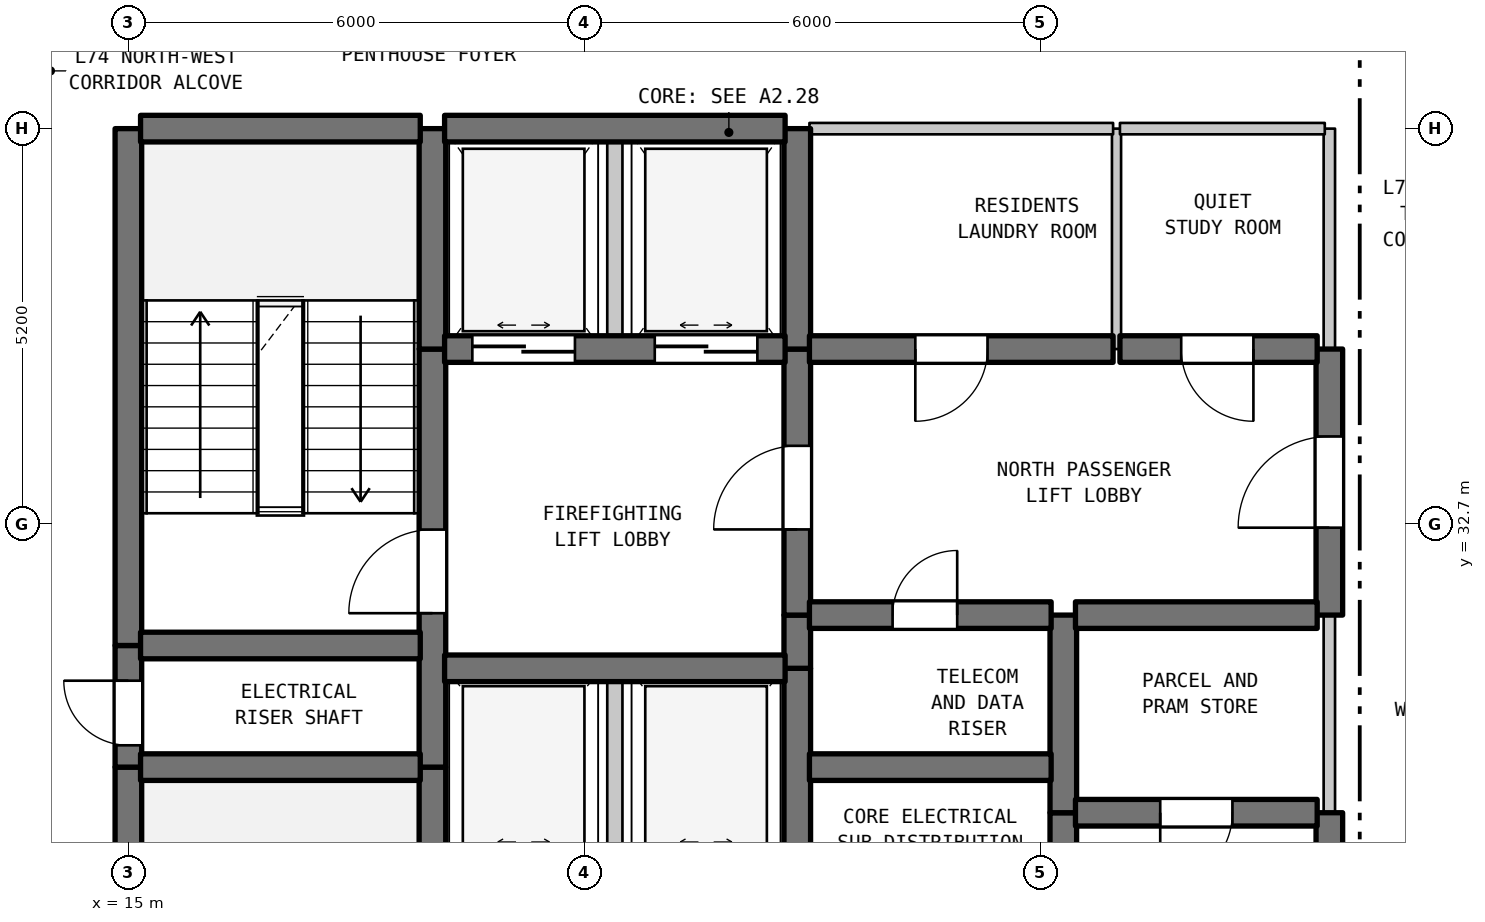
"""IFC4 building model, lengths in metres.
Left out: names, types, materials, properties, quantities, classifications, styles, units other than length and angle.
Written with IfcOpenShell. Run it as: python <this file> out.ifc"""

import sys

from ifc_helpers import new_model, si_unit, direction, frame, frame_2d, origin, place, context, subcontext, project, spatial, rectangle, extrude, element, fill, save


model = new_model("IFC4")
c1 = context("Model", 3, precision=1e-05, world=origin(), true_north=direction((0.0, 1.0)))
c2 = subcontext(c1, "Body", "Model", "MODEL_VIEW")
j1 = project(units=[si_unit("LENGTHUNIT", "METRE"), si_unit("PLANEANGLEUNIT", "RADIAN")], contexts=[c1])
p1 = place(None, origin())
s1 = spatial("IfcSite", under=j1, at=p1, CompositionType="ELEMENT")
p2 = place(p1, origin())
s2 = spatial("IfcBuilding", under=s1, at=p2, CompositionType="ELEMENT")
p3 = place(p2, frame((0.0, 0.0, 295.4)))
s3 = spatial("IfcBuildingStorey", under=s2, at=p3, CompositionType="ELEMENT", Elevation=295.4)
p4 = place(p3, frame((15.0, 22.7, 0.0), z_axis=(0.0, 0.0, 1.0), x_axis=(0.0, 1.0, 0.0)))
e1 = element("IfcWall", 1, at=p4, inside=s3, PredefinedType="SHEAR", context=c2, shape_type="SweptSolid", body=[
    extrude(rectangle(XDim=6.8, YDim=0.35, at=frame_2d((3.4, 0.0))), origin(), (0.0, 0.0, 1.0), 3.38),
])
p5 = place(p3, frame((15.0, 29.5, 0.0), z_axis=(0.0, 0.0, 1.0), x_axis=(0.0, 1.0, 0.0)))
e2 = element("IfcWall", 2, at=p5, inside=s3, PredefinedType="SHEAR", context=c2, shape_type="SweptSolid", body=[
    extrude(rectangle(XDim=1.6, YDim=0.35, at=frame_2d((0.8, 0.0))), origin(), (0.0, 0.0, 1.0), 3.38),
])
p6 = place(p5, frame((0.287, 0.0, 0.0)))
e3 = element("IfcOpeningElement", 3, at=p6, cuts=e2, PredefinedType="OPENING", context=c2, shape_type="SweptSolid", body=[
    extrude(rectangle(XDim=0.85, YDim=2.1, at=frame_2d((0.425, 1.05))), frame((0.0, 0.185, 0.0), z_axis=(0.0, -1.0, 0.0), x_axis=(1.0, 0.0, 0.0)), (0.0, 0.0, 1.0), 0.37),
])
p7 = place(p3, frame((15.0, 31.1, 0.0), z_axis=(0.0, 0.0, 1.0), x_axis=(0.0, 1.0, 0.0)))
e4 = element("IfcWall", 4, at=p7, inside=s3, PredefinedType="SHEAR", context=c2, shape_type="SweptSolid", body=[
    extrude(rectangle(XDim=6.8, YDim=0.35, at=frame_2d((3.4, 0.0))), origin(), (0.0, 0.0, 1.0), 3.38),
])
p8 = place(p3, frame((19.0, 28.2, 0.0), z_axis=(0.0, 0.0, 1.0), x_axis=(0.0, 1.0, 0.0)))
e5 = element("IfcWall", 5, at=p8, inside=s3, PredefinedType="SHEAR", context=c2, shape_type="SweptSolid", body=[
    extrude(rectangle(XDim=1.3, YDim=0.35, at=frame_2d((0.65, 0.0))), origin(), (0.0, 0.0, 1.0), 3.38),
])
p9 = place(p3, frame((19.0, 29.5, 0.0), z_axis=(0.0, 0.0, 1.0), x_axis=(0.0, 1.0, 0.0)))
e6 = element("IfcWall", 6, at=p9, inside=s3, PredefinedType="SHEAR", context=c2, shape_type="SweptSolid", body=[
    extrude(rectangle(XDim=5.5, YDim=0.35, at=frame_2d((2.75, 0.0))), origin(), (0.0, 0.0, 1.0), 3.38),
])
p10 = place(p9, frame((2.025, 0.0, 0.0)))
e7 = element("IfcOpeningElement", 7, at=p10, cuts=e6, PredefinedType="OPENING", context=c2, shape_type="SweptSolid", body=[
    extrude(rectangle(XDim=1.1, YDim=2.15, at=frame_2d((0.55, 1.075))), frame((0.0, 0.185, 0.0), z_axis=(0.0, -1.0, 0.0), x_axis=(1.0, 0.0, 0.0)), (0.0, 0.0, 1.0), 0.37),
])
p11 = place(p3, frame((19.0, 35.0, 0.0), z_axis=(0.0, 0.0, 1.0), x_axis=(0.0, 1.0, 0.0)))
e8 = element("IfcWall", 8, at=p11, inside=s3, PredefinedType="SHEAR", context=c2, shape_type="SweptSolid", body=[
    extrude(rectangle(XDim=2.9, YDim=0.35, at=frame_2d((1.45, 0.0))), origin(), (0.0, 0.0, 1.0), 3.38),
])
p12 = place(p3, frame((21.4, 28.2, 0.0), z_axis=(0.0, 0.0, 1.0), x_axis=(0.0, 1.0, 0.0)))
e9 = element("IfcWall", 9, at=p12, inside=s3, PredefinedType="STANDARD", context=c2, shape_type="SweptSolid", body=[
    extrude(rectangle(XDim=2.6, YDim=0.2, at=frame_2d((1.3, 0.0))), origin(), (0.0, 0.0, 1.0), 3.38),
])
p13 = place(p3, frame((21.4, 35.0, 0.0), z_axis=(0.0, 0.0, 1.0), x_axis=(0.0, 1.0, 0.0)))
e10 = element("IfcWall", 10, at=p13, inside=s3, PredefinedType="STANDARD", context=c2, shape_type="SweptSolid", body=[
    extrude(rectangle(XDim=2.9, YDim=0.2, at=frame_2d((1.45, 0.0))), origin(), (0.0, 0.0, 1.0), 3.38),
])
p14 = place(p3, frame((23.8, 28.2, 0.0), z_axis=(0.0, 0.0, 1.0), x_axis=(0.0, 1.0, 0.0)))
e11 = element("IfcWall", 11, at=p14, inside=s3, PredefinedType="SHEAR", context=c2, shape_type="SweptSolid", body=[
    extrude(rectangle(XDim=2.6, YDim=0.35, at=frame_2d((1.3, 0.0))), origin(), (0.0, 0.0, 1.0), 3.38),
])
p15 = place(p3, frame((23.8, 30.8, 0.0), z_axis=(0.0, 0.0, 1.0), x_axis=(0.0, 1.0, 0.0)))
e12 = element("IfcWall", 12, at=p15, inside=s3, PredefinedType="SHEAR", context=c2, shape_type="SweptSolid", body=[
    extrude(rectangle(XDim=0.7, YDim=0.35, at=frame_2d((0.35, 0.0))), origin(), (0.0, 0.0, 1.0), 3.38),
])
p16 = place(p3, frame((23.8, 31.5, 0.0), z_axis=(0.0, 0.0, 1.0), x_axis=(0.0, 1.0, 0.0)))
e13 = element("IfcWall", 13, at=p16, inside=s3, PredefinedType="SHEAR", context=c2, shape_type="SweptSolid", body=[
    extrude(rectangle(XDim=3.5, YDim=0.35, at=frame_2d((1.75, 0.0))), origin(), (0.0, 0.0, 1.0), 3.38),
])
p17 = place(p16, frame((1.127, 0.0, 0.0)))
e14 = element("IfcOpeningElement", 14, at=p17, cuts=e13, PredefinedType="OPENING", context=c2, shape_type="SweptSolid", body=[
    extrude(rectangle(XDim=1.1, YDim=2.15, at=frame_2d((0.55, 1.075))), frame((0.0, 0.185, 0.0), z_axis=(0.0, -1.0, 0.0), x_axis=(1.0, 0.0, 0.0)), (0.0, 0.0, 1.0), 0.37),
])
p18 = place(p3, frame((23.8, 35.0, 0.0), z_axis=(0.0, 0.0, 1.0), x_axis=(0.0, 1.0, 0.0)))
e15 = element("IfcWall", 15, at=p18, inside=s3, PredefinedType="SHEAR", context=c2, shape_type="SweptSolid", body=[
    extrude(rectangle(XDim=2.9, YDim=0.35, at=frame_2d((1.45, 0.0))), origin(), (0.0, 0.0, 1.0), 3.38),
])
p19 = place(p3, frame((27.3, 26.1, 0.0), z_axis=(0.0, 0.0, 1.0), x_axis=(0.0, 1.0, 0.0)))
e16 = element("IfcWall", 16, at=p19, inside=s3, PredefinedType="SHEAR", context=c2, shape_type="SweptSolid", body=[
    extrude(rectangle(XDim=2.8, YDim=0.35, at=frame_2d((1.4, 0.0))), origin(), (0.0, 0.0, 1.0), 3.38),
])
p20 = place(p3, frame((27.3, 28.9, 0.0), z_axis=(0.0, 0.0, 1.0), x_axis=(0.0, 1.0, 0.0)))
e17 = element("IfcWall", 17, at=p20, inside=s3, PredefinedType="SHEAR", context=c2, shape_type="SweptSolid", body=[
    extrude(rectangle(XDim=2.6, YDim=0.35, at=frame_2d((1.3, 0.0))), origin(), (0.0, 0.0, 1.0), 3.38),
])
p21 = place(p3, frame((28.0, 35.0, 0.0), z_axis=(0.0, 0.0, 1.0), x_axis=(0.0, 1.0, 0.0)))
e18 = element("IfcWall", 18, at=p21, inside=s3, PredefinedType="PARTITIONING", context=c2, shape_type="SweptSolid", body=[
    extrude(rectangle(XDim=2.9, YDim=0.12, at=frame_2d((1.45, 0.0))), origin(), (0.0, 0.0, 1.0), 3.38),
])
p22 = place(p3, frame((30.8, 25.6, 0.0), z_axis=(0.0, 0.0, 1.0), x_axis=(0.0, 1.0, 0.0)))
e19 = element("IfcWall", 19, at=p22, inside=s3, PredefinedType="SHEAR", context=c2, shape_type="SweptSolid", body=[
    extrude(rectangle(XDim=3.3, YDim=0.35, at=frame_2d((1.65, 0.0))), origin(), (0.0, 0.0, 1.0), 3.38),
])
p23 = place(p22, frame((0.978, 0.0, 0.0)))
e20 = element("IfcOpeningElement", 20, at=p23, cuts=e19, PredefinedType="OPENING", context=c2, shape_type="SweptSolid", body=[
    extrude(rectangle(XDim=1.2, YDim=2.2, at=frame_2d((0.6, 1.1))), frame((0.0, 0.185, 0.0), z_axis=(0.0, -1.0, 0.0), x_axis=(1.0, 0.0, 0.0)), (0.0, 0.0, 1.0), 0.37),
])
p24 = place(p3, frame((30.8, 28.9, 0.0), z_axis=(0.0, 0.0, 1.0), x_axis=(0.0, 1.0, 0.0)))
e21 = element("IfcWall", 21, at=p24, inside=s3, PredefinedType="STANDARD", context=c2, shape_type="SweptSolid", body=[
    extrude(rectangle(XDim=2.6, YDim=0.15, at=frame_2d((1.3, 0.0))), origin(), (0.0, 0.0, 1.0), 3.38),
])
p25 = place(p3, frame((30.8, 31.5, 0.0), z_axis=(0.0, 0.0, 1.0), x_axis=(0.0, 1.0, 0.0)))
e22 = element("IfcWall", 22, at=p25, inside=s3, PredefinedType="SHEAR", context=c2, shape_type="SweptSolid", body=[
    extrude(rectangle(XDim=3.5, YDim=0.35, at=frame_2d((1.75, 0.0))), origin(), (0.0, 0.0, 1.0), 3.38),
])
p26 = place(p25, frame((1.15, 0.0, 0.0)))
e23 = element("IfcOpeningElement", 23, at=p26, cuts=e22, PredefinedType="OPENING", context=c2, shape_type="SweptSolid", body=[
    extrude(rectangle(XDim=1.2, YDim=2.2, at=frame_2d((0.6, 1.1))), frame((0.0, 0.185, 0.0), z_axis=(0.0, -1.0, 0.0), x_axis=(1.0, 0.0, 0.0)), (0.0, 0.0, 1.0), 0.37),
])
p27 = place(p3, frame((30.8, 35.0, 0.0), z_axis=(0.0, 0.0, 1.0), x_axis=(0.0, 1.0, 0.0)))
e24 = element("IfcWall", 24, at=p27, inside=s3, PredefinedType="STANDARD", context=c2, shape_type="SweptSolid", body=[
    extrude(rectangle(XDim=2.9, YDim=0.15, at=frame_2d((1.45, 0.0))), origin(), (0.0, 0.0, 1.0), 3.38),
])
p28 = place(p3, frame((27.46, 28.9, 0.0), z_axis=(0.0, 0.0, 1.0), x_axis=(1.0, 0.0, 0.0)))
e25 = element("IfcWall", 25, at=p28, inside=s3, PredefinedType="SHEAR", context=c2, shape_type="SweptSolid", body=[
    extrude(rectangle(XDim=3.18, YDim=0.35, at=frame_2d((1.59, 0.0))), origin(), (0.0, 0.0, 1.0), 3.38),
])
p29 = place(p28, frame((1.115, 0.0, 0.0)))
e26 = element("IfcOpeningElement", 26, at=p29, cuts=e25, PredefinedType="OPENING", context=c2, shape_type="SweptSolid", body=[
    extrude(rectangle(XDim=0.95, YDim=2.15, at=frame_2d((0.475, 1.075))), frame((0.0, 0.185, 0.0), z_axis=(0.0, -1.0, 0.0), x_axis=(1.0, 0.0, 0.0)), (0.0, 0.0, 1.0), 0.37),
])
p30 = place(p3, frame((15.16, 29.5, 0.0), z_axis=(0.0, 0.0, 1.0), x_axis=(1.0, 0.0, 0.0)))
e27 = element("IfcWall", 27, at=p30, inside=s3, PredefinedType="SHEAR", context=c2, shape_type="SweptSolid", body=[
    extrude(rectangle(XDim=3.68, YDim=0.35, at=frame_2d((1.84, 0.0))), origin(), (0.0, 0.0, 1.0), 3.38),
])
p31 = place(p3, frame((23.96, 29.5, 0.0), z_axis=(0.0, 0.0, 1.0), x_axis=(1.0, 0.0, 0.0)))
e28 = element("IfcWall", 28, at=p31, inside=s3, PredefinedType="SHEAR", context=c2, shape_type="SweptSolid", body=[
    extrude(rectangle(XDim=3.18, YDim=0.35, at=frame_2d((1.59, 0.0))), origin(), (0.0, 0.0, 1.0), 3.38),
])
p32 = place(p3, frame((19.16, 30.8, 0.0), z_axis=(0.0, 0.0, 1.0), x_axis=(1.0, 0.0, 0.0)))
e29 = element("IfcWall", 29, at=p32, inside=s3, PredefinedType="SHEAR", context=c2, shape_type="SweptSolid", body=[
    extrude(rectangle(XDim=4.48, YDim=0.35, at=frame_2d((2.24, 0.0))), origin(), (0.0, 0.0, 1.0), 3.38),
])
p33 = place(p3, frame((15.16, 31.1, 0.0), z_axis=(0.0, 0.0, 1.0), x_axis=(1.0, 0.0, 0.0)))
e30 = element("IfcWall", 30, at=p33, inside=s3, PredefinedType="SHEAR", context=c2, shape_type="SweptSolid", body=[
    extrude(rectangle(XDim=3.68, YDim=0.35, at=frame_2d((1.84, 0.0))), origin(), (0.0, 0.0, 1.0), 3.38),
])
p34 = place(p3, frame((23.96, 31.5, 0.0), z_axis=(0.0, 0.0, 1.0), x_axis=(1.0, 0.0, 0.0)))
e31 = element("IfcWall", 31, at=p34, inside=s3, PredefinedType="SHEAR", context=c2, shape_type="SweptSolid", body=[
    extrude(rectangle(XDim=3.18, YDim=0.35, at=frame_2d((1.59, 0.0))), origin(), (0.0, 0.0, 1.0), 3.38),
])
p35 = place(p34, frame((1.094, 0.0, 0.0)))
e32 = element("IfcOpeningElement", 32, at=p35, cuts=e31, PredefinedType="OPENING", context=c2, shape_type="SweptSolid", body=[
    extrude(rectangle(XDim=0.85, YDim=2.1, at=frame_2d((0.425, 1.05))), frame((0.0, 0.185, 0.0), z_axis=(0.0, -1.0, 0.0), x_axis=(1.0, 0.0, 0.0)), (0.0, 0.0, 1.0), 0.37),
])
p36 = place(p3, frame((27.46, 31.5, 0.0), z_axis=(0.0, 0.0, 1.0), x_axis=(1.0, 0.0, 0.0)))
e33 = element("IfcWall", 33, at=p36, inside=s3, PredefinedType="SHEAR", context=c2, shape_type="SweptSolid", body=[
    extrude(rectangle(XDim=3.18, YDim=0.35, at=frame_2d((1.59, 0.0))), origin(), (0.0, 0.0, 1.0), 3.38),
])
p37 = place(p3, frame((19.16, 35.0, 0.0), z_axis=(0.0, 0.0, 1.0), x_axis=(1.0, 0.0, 0.0)))
e34 = element("IfcWall", 34, at=p37, inside=s3, PredefinedType="SHEAR", context=c2, shape_type="SweptSolid", body=[
    extrude(rectangle(XDim=4.48, YDim=0.35, at=frame_2d((2.24, 0.0))), origin(), (0.0, 0.0, 1.0), 3.38),
])
p38 = place(p37, frame((0.365, 0.0, 0.0)))
e35 = element("IfcOpeningElement", 35, at=p38, cuts=e34, PredefinedType="OPENING", context=c2, shape_type="SweptSolid", body=[
    extrude(rectangle(XDim=1.35, YDim=2.2, at=frame_2d((0.675, 1.1))), frame((0.0, 0.185, 0.0), z_axis=(0.0, -1.0, 0.0), x_axis=(1.0, 0.0, 0.0)), (0.0, 0.0, 1.0), 0.37),
])
p39 = place(p37, frame((2.765, 0.0, 0.0)))
e36 = element("IfcOpeningElement", 36, at=p39, cuts=e34, PredefinedType="OPENING", context=c2, shape_type="SweptSolid", body=[
    extrude(rectangle(XDim=1.35, YDim=2.2, at=frame_2d((0.675, 1.1))), frame((0.0, 0.185, 0.0), z_axis=(0.0, -1.0, 0.0), x_axis=(1.0, 0.0, 0.0)), (0.0, 0.0, 1.0), 0.37),
])
p40 = place(p3, frame((23.96, 35.0, 0.0), z_axis=(0.0, 0.0, 1.0), x_axis=(1.0, 0.0, 0.0)))
e37 = element("IfcWall", 37, at=p40, inside=s3, PredefinedType="SHEAR", context=c2, shape_type="SweptSolid", body=[
    extrude(rectangle(XDim=3.995, YDim=0.35, at=frame_2d((1.998, 0.0))), origin(), (0.0, 0.0, 1.0), 3.38),
])
p41 = place(p40, frame((1.393, 0.0, 0.0)))
e38 = element("IfcOpeningElement", 38, at=p41, cuts=e37, PredefinedType="OPENING", context=c2, shape_type="SweptSolid", body=[
    extrude(rectangle(XDim=0.95, YDim=2.15, at=frame_2d((0.475, 1.075))), frame((0.0, 0.185, 0.0), z_axis=(0.0, -1.0, 0.0), x_axis=(1.0, 0.0, 0.0)), (0.0, 0.0, 1.0), 0.37),
])
p42 = place(p3, frame((28.045, 35.0, 0.0), z_axis=(0.0, 0.0, 1.0), x_axis=(1.0, 0.0, 0.0)))
e39 = element("IfcWall", 39, at=p42, inside=s3, PredefinedType="SHEAR", context=c2, shape_type="SweptSolid", body=[
    extrude(rectangle(XDim=2.595, YDim=0.35, at=frame_2d((1.297, 0.0))), origin(), (0.0, 0.0, 1.0), 3.38),
])
p43 = place(p42, frame((0.806, 0.0, 0.0)))
e40 = element("IfcOpeningElement", 40, at=p43, cuts=e39, PredefinedType="OPENING", context=c2, shape_type="SweptSolid", body=[
    extrude(rectangle(XDim=0.95, YDim=2.15, at=frame_2d((0.475, 1.075))), frame((0.0, 0.185, 0.0), z_axis=(0.0, -1.0, 0.0), x_axis=(1.0, 0.0, 0.0)), (0.0, 0.0, 1.0), 0.37),
])
p44 = place(p3, frame((15.16, 37.9, 0.0), z_axis=(0.0, 0.0, 1.0), x_axis=(1.0, 0.0, 0.0)))
e41 = element("IfcWall", 41, at=p44, inside=s3, PredefinedType="SHEAR", context=c2, shape_type="SweptSolid", body=[
    extrude(rectangle(XDim=3.68, YDim=0.35, at=frame_2d((1.84, 0.0))), origin(), (0.0, 0.0, 1.0), 3.38),
])
p45 = place(p3, frame((19.16, 37.9, 0.0), z_axis=(0.0, 0.0, 1.0), x_axis=(1.0, 0.0, 0.0)))
e42 = element("IfcWall", 42, at=p45, inside=s3, PredefinedType="SHEAR", context=c2, shape_type="SweptSolid", body=[
    extrude(rectangle(XDim=4.48, YDim=0.35, at=frame_2d((2.24, 0.0))), origin(), (0.0, 0.0, 1.0), 3.38),
])
p46 = place(p3, frame((23.96, 37.9, 0.0), z_axis=(0.0, 0.0, 1.0), x_axis=(1.0, 0.0, 0.0)))
e43 = element("IfcWall", 43, at=p46, inside=s3, PredefinedType="STANDARD", context=c2, shape_type="SweptSolid", body=[
    extrude(rectangle(XDim=3.995, YDim=0.15, at=frame_2d((1.998, 0.0))), origin(), (0.0, 0.0, 1.0), 2.88),
])
p47 = place(p3, frame((28.045, 37.9, 0.0), z_axis=(0.0, 0.0, 1.0), x_axis=(1.0, 0.0, 0.0)))
e44 = element("IfcWall", 44, at=p47, inside=s3, PredefinedType="STANDARD", context=c2, shape_type="SweptSolid", body=[
    extrude(rectangle(XDim=2.695, YDim=0.15, at=frame_2d((1.348, 0.0))), origin(), (0.0, 0.0, 1.0), 2.88),
])
p48 = place(p6, origin())
e45 = element("IfcDoor", 45, at=p48, inside=s3, OperationType="SINGLE_SWING_RIGHT", PredefinedType="DOOR", context=c2, shape_type="SweptSolid", body=[
    extrude(rectangle(XDim=0.85, YDim=2.1, at=frame_2d((0.425, 1.05))), frame((0.0, 0.025, 0.0), z_axis=(0.0, -1.0, 0.0), x_axis=(1.0, 0.0, 0.0)), (0.0, 0.0, 1.0), 0.05),
])
fill(e3, e45)
p49 = place(p10, origin())
e46 = element("IfcDoor", 46, at=p49, inside=s3, OperationType="SINGLE_SWING_LEFT", PredefinedType="DOOR", context=c2, shape_type="SweptSolid", body=[
    extrude(rectangle(XDim=1.1, YDim=2.15, at=frame_2d((0.55, 1.075))), frame((0.0, 0.025, 0.0), z_axis=(0.0, -1.0, 0.0), x_axis=(1.0, 0.0, 0.0)), (0.0, 0.0, 1.0), 0.05),
])
fill(e7, e46)
p50 = place(p17, origin())
e47 = element("IfcDoor", 47, at=p50, inside=s3, OperationType="SINGLE_SWING_LEFT", PredefinedType="DOOR", context=c2, shape_type="SweptSolid", body=[
    extrude(rectangle(XDim=1.1, YDim=2.15, at=frame_2d((0.55, 1.075))), frame((0.0, 0.025, 0.0), z_axis=(0.0, -1.0, 0.0), x_axis=(1.0, 0.0, 0.0)), (0.0, 0.0, 1.0), 0.05),
])
fill(e14, e47)
p51 = place(p26, origin())
e48 = element("IfcDoor", 48, at=p51, inside=s3, OperationType="SINGLE_SWING_LEFT", PredefinedType="DOOR", context=c2, shape_type="SweptSolid", body=[
    extrude(rectangle(XDim=1.2, YDim=2.2, at=frame_2d((0.6, 1.1))), frame((0.0, 0.025, 0.0), z_axis=(0.0, -1.0, 0.0), x_axis=(1.0, 0.0, 0.0)), (0.0, 0.0, 1.0), 0.05),
])
fill(e23, e48)
p52 = place(p29, frame((0.95, 0.0, 0.0), z_axis=(0.0, 0.0, 1.0), x_axis=(-1.0, 0.0, 0.0)))
e49 = element("IfcDoor", 49, at=p52, inside=s3, OperationType="SINGLE_SWING_LEFT", PredefinedType="DOOR", context=c2, shape_type="SweptSolid", body=[
    extrude(rectangle(XDim=0.95, YDim=2.15, at=frame_2d((0.475, 1.075))), frame((0.0, 0.025, 0.0), z_axis=(0.0, -1.0, 0.0), x_axis=(1.0, 0.0, 0.0)), (0.0, 0.0, 1.0), 0.05),
])
fill(e26, e49)
p53 = place(p35, origin())
e50 = element("IfcDoor", 50, at=p53, inside=s3, OperationType="SINGLE_SWING_RIGHT", PredefinedType="DOOR", context=c2, shape_type="SweptSolid", body=[
    extrude(rectangle(XDim=0.85, YDim=2.1, at=frame_2d((0.425, 1.05))), frame((0.0, 0.025, 0.0), z_axis=(0.0, -1.0, 0.0), x_axis=(1.0, 0.0, 0.0)), (0.0, 0.0, 1.0), 0.05),
])
fill(e32, e50)
p54 = place(p38, origin())
e51 = element("IfcDoor", 51, at=p54, inside=s3, OperationType="DOUBLE_DOOR_SLIDING", PredefinedType="DOOR", context=c2, shape_type="SweptSolid", body=[
    extrude(rectangle(XDim=1.35, YDim=2.2, at=frame_2d((0.675, 1.1))), frame((0.0, 0.025, 0.0), z_axis=(0.0, -1.0, 0.0), x_axis=(1.0, 0.0, 0.0)), (0.0, 0.0, 1.0), 0.05),
])
fill(e35, e51)
p55 = place(p39, origin())
e52 = element("IfcDoor", 52, at=p55, inside=s3, OperationType="DOUBLE_DOOR_SLIDING", PredefinedType="DOOR", context=c2, shape_type="SweptSolid", body=[
    extrude(rectangle(XDim=1.35, YDim=2.2, at=frame_2d((0.675, 1.1))), frame((0.0, 0.025, 0.0), z_axis=(0.0, -1.0, 0.0), x_axis=(1.0, 0.0, 0.0)), (0.0, 0.0, 1.0), 0.05),
])
fill(e36, e52)
p56 = place(p41, frame((0.95, 0.0, 0.0), z_axis=(0.0, 0.0, 1.0), x_axis=(-1.0, 0.0, 0.0)))
e53 = element("IfcDoor", 53, at=p56, inside=s3, OperationType="SINGLE_SWING_LEFT", PredefinedType="DOOR", context=c2, shape_type="SweptSolid", body=[
    extrude(rectangle(XDim=0.95, YDim=2.15, at=frame_2d((0.475, 1.075))), frame((0.0, 0.025, 0.0), z_axis=(0.0, -1.0, 0.0), x_axis=(1.0, 0.0, 0.0)), (0.0, 0.0, 1.0), 0.05),
])
fill(e38, e53)
p57 = place(p43, frame((0.95, 0.0, 0.0), z_axis=(0.0, 0.0, 1.0), x_axis=(-1.0, 0.0, 0.0)))
e54 = element("IfcDoor", 54, at=p57, inside=s3, OperationType="SINGLE_SWING_RIGHT", PredefinedType="DOOR", context=c2, shape_type="SweptSolid", body=[
    extrude(rectangle(XDim=0.95, YDim=2.15, at=frame_2d((0.475, 1.075))), frame((0.0, 0.025, 0.0), z_axis=(0.0, -1.0, 0.0), x_axis=(1.0, 0.0, 0.0)), (0.0, 0.0, 1.0), 0.05),
])
fill(e40, e54)
save(model, sys.argv[1])
